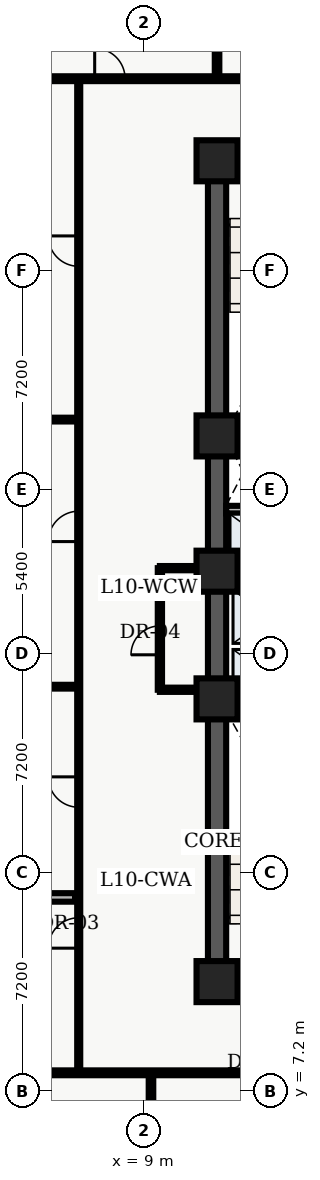
"""IFC4 building model, lengths in metres.
Left out: names, types, materials, properties, quantities, classifications, styles, units other than length and angle.
Written with IfcOpenShell. Run it as: python <this file> out.ifc"""

import sys

from ifc_helpers import new_model, entity, si_unit, converted_unit, direction, frame, origin_with_axes, origin_2d_with_axis, place, context, subcontext, project, spatial, polyline, rectangle, outline, extrude, element, fill, save


model = new_model("IFC4")
c1 = context("Model", 3, precision=1e-05, world=origin_with_axes(), true_north=direction((0.0, 1.0)))
c2 = subcontext(c1, "Body", "Model", "MODEL_VIEW")
j1 = project(units=[si_unit("LENGTHUNIT", "METRE"), converted_unit("PLANEANGLEUNIT", "DEGREE", entity("IfcPlaneAngleMeasure", 0.017), si_unit("PLANEANGLEUNIT", "RADIAN"), dimensions=[0, 0, 0, 0, 0, 0, 0])], contexts=[c1])
p1 = place(None, origin_with_axes())
s1 = spatial("IfcSite", under=j1, at=p1, CompositionType="ELEMENT")
p2 = place(p1, origin_with_axes())
s2 = spatial("IfcBuilding", under=s1, at=p2, CompositionType="ELEMENT")
p3 = place(p2, frame((0.0, 0.0, 44.4), z_axis=(0.0, 0.0, 1.0), x_axis=(1.0, 0.0, 0.0)))
s3 = spatial("IfcBuildingStorey", under=s2, at=p3, CompositionType="ELEMENT", Elevation=44.4)
p4 = place(p3, frame((11.4, 10.8, 0.0), z_axis=(0.0, 0.0, 1.0), x_axis=(0.0, 1.0, 0.0)))
e1 = element("IfcWall", 1, at=p4, inside=s3, PredefinedType="SHEAR", context=c2, shape_type="SweptSolid", body=[
    extrude(outline(polyline([(0.0, -0.3), (27.0, -0.3), (27.0, 0.3), (0.0, 0.3), (0.0, -0.3)])), origin_with_axes(), (0.0, 0.0, 1.0), 3.66),
])
p5 = place(p3, frame((11.4, 10.8, 0.0), z_axis=(0.0, 0.0, 1.0), x_axis=(1.0, 0.0, 0.0)))
e2 = element("IfcWall", 2, at=p5, inside=s3, PredefinedType="SHEAR", context=c2, shape_type="SweptSolid", body=[
    extrude(outline(polyline([(0.0, -0.3), (7.2, -0.3), (7.2, 0.3), (0.0, 0.3), (0.0, -0.3)])), origin_with_axes(), (0.0, 0.0, 1.0), 3.66),
])
p6 = place(p5, frame((2.625, 0.0, 0.0), z_axis=(0.0, 0.0, 1.0), x_axis=(1.0, 0.0, 0.0)))
e3 = element("IfcOpeningElement", 3, at=p6, cuts=e2, PredefinedType="OPENING", context=c2, shape_type="SweptSolid", body=[
    extrude(rectangle(XDim=1.05, YDim=0.62, at=origin_2d_with_axis()), origin_with_axes(), (0.0, 0.0, 1.0), 2.15),
])
p7 = place(p3, frame((11.4, 37.8, 0.0), z_axis=(0.0, 0.0, 1.0), x_axis=(1.0, 0.0, 0.0)))
e4 = element("IfcWall", 4, at=p7, inside=s3, PredefinedType="SHEAR", context=c2, shape_type="SweptSolid", body=[
    extrude(outline(polyline([(0.0, -0.3), (7.2, -0.3), (7.2, 0.3), (0.0, 0.3), (0.0, -0.3)])), origin_with_axes(), (0.0, 0.0, 1.0), 3.66),
])
p8 = place(p7, frame((2.625, 0.0, 0.0), z_axis=(0.0, 0.0, 1.0), x_axis=(1.0, 0.0, 0.0)))
e5 = element("IfcOpeningElement", 5, at=p8, cuts=e4, PredefinedType="OPENING", context=c2, shape_type="SweptSolid", body=[
    extrude(rectangle(XDim=1.05, YDim=0.62, at=origin_2d_with_axis()), origin_with_axes(), (0.0, 0.0, 1.0), 2.15),
])
for number, where, z_axis, x_axis in (
    (6, (11.7, 19.825, 0.0), (0.0, 0.0, 1.0), (1.0, 0.0, 0.0)),
    (7, (11.7, 28.775, 0.0), (0.0, 0.0, 1.0), (1.0, 0.0, 0.0)),
):
    element("IfcWall", number, at=place(p3, frame(where, z_axis=z_axis, x_axis=x_axis)), inside=s3, PredefinedType="SHEAR", context=c2, shape_type="SweptSolid", body=[
        extrude(outline(polyline([(0.0, -0.125), (6.6, -0.125), (6.6, 0.125), (0.0, 0.125), (0.0, -0.125)])), origin_with_axes(), (0.0, 0.0, 1.0), 3.66),
    ])
p9 = place(p3, frame((11.7, 24.1, 0.0), z_axis=(0.0, 0.0, 1.0), x_axis=(1.0, 0.0, 0.0)))
e8 = element("IfcWall", 8, at=p9, inside=s3, PredefinedType="SOLIDWALL", context=c2, shape_type="SweptSolid", body=[
    extrude(outline(polyline([(0.0, -0.125), (6.6, -0.125), (6.6, 0.125), (0.0, 0.125), (0.0, -0.125)])), origin_with_axes(), (0.0, 0.0, 1.0), 2.7),
])
p10 = place(p9, frame((3.6, 0.0, 0.0), z_axis=(0.0, 0.0, 1.0), x_axis=(1.0, 0.0, 0.0)))
e9 = element("IfcOpeningElement", 9, at=p10, cuts=e8, PredefinedType="OPENING", context=c2, shape_type="SweptSolid", body=[
    extrude(rectangle(XDim=0.9, YDim=0.27, at=origin_2d_with_axis()), origin_with_axes(), (0.0, 0.0, 1.0), 2.15),
])
p11 = place(p9, frame((5.65, 0.0, 0.0), z_axis=(0.0, 0.0, 1.0), x_axis=(1.0, 0.0, 0.0)))
e10 = element("IfcOpeningElement", 10, at=p11, cuts=e8, PredefinedType="OPENING", context=c2, shape_type="SweptSolid", body=[
    extrude(rectangle(XDim=0.9, YDim=0.27, at=origin_2d_with_axis()), origin_with_axes(), (0.0, 0.0, 1.0), 2.15),
])
p12 = place(p3, frame((11.7, 26.325, 0.0), z_axis=(0.0, 0.0, 1.0), x_axis=(1.0, 0.0, 0.0)))
e11 = element("IfcWall", 11, at=p12, inside=s3, PredefinedType="SOLIDWALL", context=c2, shape_type="SweptSolid", body=[
    extrude(outline(polyline([(0.0, -0.125), (6.6, -0.125), (6.6, 0.125), (0.0, 0.125), (0.0, -0.125)])), origin_with_axes(), (0.0, 0.0, 1.0), 2.7),
])
p13 = place(p12, frame((3.5, 0.0, 0.0), z_axis=(0.0, 0.0, 1.0), x_axis=(1.0, 0.0, 0.0)))
e12 = element("IfcOpeningElement", 12, at=p13, cuts=e11, PredefinedType="OPENING", context=c2, shape_type="SweptSolid", body=[
    extrude(rectangle(XDim=0.9, YDim=0.27, at=origin_2d_with_axis()), origin_with_axes(), (0.0, 0.0, 1.0), 2.15),
])
for number, where, z_axis, x_axis in (
    (13, (11.4, 10.8, 0.0), (0.0, 0.0, 1.0), (1.0, 0.0, 0.0)),
    (14, (11.4, 20.1, 0.0), (0.0, 0.0, 1.0), (1.0, 0.0, 0.0)),
    (15, (11.4, 24.3, 0.0), (0.0, 0.0, 1.0), (1.0, 0.0, 0.0)),
    (16, (11.4, 28.75, 0.0), (0.0, 0.0, 1.0), (1.0, 0.0, 0.0)),
    (17, (11.4, 37.8, 0.0), (0.0, 0.0, 1.0), (1.0, 0.0, 0.0)),
):
    element("IfcColumn", number, at=place(p3, frame(where, z_axis=z_axis, x_axis=x_axis)), inside=s3, PredefinedType="COLUMN", context=c2, shape_type="SweptSolid", body=[
        extrude(rectangle(XDim=1.35, YDim=1.35, at=origin_2d_with_axis()), origin_with_axes(), (0.0, 0.0, 1.0), 3.9),
    ])
p14 = place(p3, frame((9.52, 20.4, 0.0), z_axis=(0.0, 0.0, 1.0), x_axis=(0.0, 1.0, 0.0)))
e18 = element("IfcWall", 18, at=p14, inside=s3, PredefinedType="PARTITIONING", context=c2, shape_type="SweptSolid", body=[
    extrude(outline(polyline([(0.0, -0.07), (4.0, -0.07), (4.0, 0.07), (0.0, 0.07), (0.0, -0.07)])), origin_with_axes(), (0.0, 0.0, 1.0), 2.7),
])
p15 = place(p14, frame((1.625, 0.0, 0.0), z_axis=(0.0, 0.0, 1.0), x_axis=(1.0, 0.0, 0.0)))
e19 = element("IfcOpeningElement", 19, at=p15, cuts=e18, PredefinedType="OPENING", context=c2, shape_type="SweptSolid", body=[
    extrude(rectangle(XDim=0.95, YDim=0.16, at=origin_2d_with_axis()), origin_with_axes(), (0.0, 0.0, 1.0), 2.15),
])
for number, where, z_axis, x_axis in (
    (20, (9.52, 20.4, 0.0), (0.0, 0.0, 1.0), (1.0, 0.0, 0.0)),
    (21, (9.52, 24.4, 0.0), (0.0, 0.0, 1.0), (1.0, 0.0, 0.0)),
):
    element("IfcWall", number, at=place(p3, frame(where, z_axis=z_axis, x_axis=x_axis)), inside=s3, PredefinedType="PARTITIONING", context=c2, shape_type="SweptSolid", body=[
        extrude(outline(polyline([(0.0, -0.07), (1.58, -0.07), (1.58, 0.07), (0.0, 0.07), (0.0, -0.07)])), origin_with_axes(), (0.0, 0.0, 1.0), 2.7),
    ])
p16 = place(p3, frame((2.6, 7.8, 0.0), z_axis=(0.0, 0.0, 1.0), x_axis=(1.0, 0.0, 0.0)))
e22 = element("IfcWall", 22, at=p16, inside=s3, PredefinedType="PARTITIONING", context=c2, shape_type="SweptSolid", body=[
    extrude(outline(polyline([(0.0, -0.08), (18.55, -0.08), (18.55, 0.08), (0.0, 0.08), (0.0, -0.08)])), origin_with_axes(), (0.0, 0.0, 1.0), 2.7),
])
p17 = place(p16, frame((2.059, 0.0, 0.0), z_axis=(0.0, 0.0, 1.0), x_axis=(1.0, 0.0, 0.0)))
e23 = element("IfcOpeningElement", 23, at=p17, cuts=e22, PredefinedType="OPENING", context=c2, shape_type="SweptSolid", body=[
    extrude(rectangle(XDim=1.0, YDim=0.18, at=origin_2d_with_axis()), origin_with_axes(), (0.0, 0.0, 1.0), 2.15),
])
p18 = place(p16, frame((10.516, 0.0, 0.0), z_axis=(0.0, 0.0, 1.0), x_axis=(1.0, 0.0, 0.0)))
e24 = element("IfcOpeningElement", 24, at=p18, cuts=e22, PredefinedType="OPENING", context=c2, shape_type="SweptSolid", body=[
    extrude(rectangle(XDim=1.2, YDim=0.18, at=origin_2d_with_axis()), origin_with_axes(), (0.0, 0.0, 1.0), 2.2),
])
p19 = place(p16, frame((16.453, 0.0, 0.0), z_axis=(0.0, 0.0, 1.0), x_axis=(1.0, 0.0, 0.0)))
e25 = element("IfcOpeningElement", 25, at=p19, cuts=e22, PredefinedType="OPENING", context=c2, shape_type="SweptSolid", body=[
    extrude(rectangle(XDim=1.0, YDim=0.18, at=origin_2d_with_axis()), origin_with_axes(), (0.0, 0.0, 1.0), 2.15),
])
p20 = place(p3, frame((2.6, 40.5, 0.0), z_axis=(0.0, 0.0, 1.0), x_axis=(1.0, 0.0, 0.0)))
e26 = element("IfcWall", 26, at=p20, inside=s3, PredefinedType="PARTITIONING", context=c2, shape_type="SweptSolid", body=[
    extrude(outline(polyline([(0.0, -0.08), (18.65, -0.08), (18.65, 0.08), (0.0, 0.08), (0.0, -0.08)])), origin_with_axes(), (0.0, 0.0, 1.0), 2.7),
])
p21 = place(p20, frame((5.275, 0.0, 0.0), z_axis=(0.0, 0.0, 1.0), x_axis=(1.0, 0.0, 0.0)))
e27 = element("IfcOpeningElement", 27, at=p21, cuts=e26, PredefinedType="OPENING", context=c2, shape_type="SweptSolid", body=[
    extrude(rectangle(XDim=1.0, YDim=0.18, at=origin_2d_with_axis()), origin_with_axes(), (0.0, 0.0, 1.0), 2.15),
])
p22 = place(p20, frame((12.61, 0.0, 0.0), z_axis=(0.0, 0.0, 1.0), x_axis=(1.0, 0.0, 0.0)))
e28 = element("IfcOpeningElement", 28, at=p22, cuts=e26, PredefinedType="OPENING", context=c2, shape_type="SweptSolid", body=[
    extrude(rectangle(XDim=1.2, YDim=0.18, at=origin_2d_with_axis()), origin_with_axes(), (0.0, 0.0, 1.0), 2.2),
])
p23 = place(p3, frame((6.85, 7.8, 0.0), z_axis=(0.0, 0.0, 1.0), x_axis=(0.0, 1.0, 0.0)))
e29 = element("IfcWall", 29, at=p23, inside=s3, PredefinedType="PARTITIONING", context=c2, shape_type="SweptSolid", body=[
    extrude(outline(polyline([(0.0, -0.05), (32.7, -0.05), (32.7, 0.05), (0.0, 0.05), (0.0, -0.05)])), origin_with_axes(), (0.0, 0.0, 1.0), 2.7),
])
p24 = place(p23, frame((4.6, 0.0, 0.0), z_axis=(0.0, 0.0, 1.0), x_axis=(1.0, 0.0, 0.0)))
e30 = element("IfcOpeningElement", 30, at=p24, cuts=e29, PredefinedType="OPENING", context=c2, shape_type="SweptSolid", body=[
    extrude(rectangle(XDim=1.0, YDim=0.12, at=origin_2d_with_axis()), origin_with_axes(), (0.0, 0.0, 1.0), 2.15),
])
p25 = place(p23, frame((9.235, 0.0, 0.0), z_axis=(0.0, 0.0, 1.0), x_axis=(1.0, 0.0, 0.0)))
e31 = element("IfcOpeningElement", 31, at=p25, cuts=e29, PredefinedType="OPENING", context=c2, shape_type="SweptSolid", body=[
    extrude(rectangle(XDim=1.0, YDim=0.12, at=origin_2d_with_axis()), origin_with_axes(), (0.0, 0.0, 1.0), 2.15),
])
p26 = place(p23, frame((17.974, 0.0, 0.0), z_axis=(0.0, 0.0, 1.0), x_axis=(1.0, 0.0, 0.0)))
e32 = element("IfcOpeningElement", 32, at=p26, cuts=e29, PredefinedType="OPENING", context=c2, shape_type="SweptSolid", body=[
    extrude(rectangle(XDim=1.0, YDim=0.12, at=origin_2d_with_axis()), origin_with_axes(), (0.0, 0.0, 1.0), 2.15),
])
p27 = place(p23, frame((27.029, 0.0, 0.0), z_axis=(0.0, 0.0, 1.0), x_axis=(1.0, 0.0, 0.0)))
e33 = element("IfcOpeningElement", 33, at=p27, cuts=e29, PredefinedType="OPENING", context=c2, shape_type="SweptSolid", body=[
    extrude(rectangle(XDim=1.0, YDim=0.12, at=origin_2d_with_axis()), origin_with_axes(), (0.0, 0.0, 1.0), 2.15),
])
p28 = place(p3, frame((0.375, 13.569, 0.0), z_axis=(0.0, 0.0, 1.0), x_axis=(1.0, 0.0, 0.0)))
e34 = element("IfcWall", 34, at=p28, inside=s3, PredefinedType="PARTITIONING", context=c2, shape_type="SweptSolid", body=[
    extrude(outline(polyline([(0.0, -0.14), (6.355, -0.14), (6.355, 0.14), (0.0, 0.14), (0.0, -0.14)])), origin_with_axes(), (0.0, 0.0, 1.0), 2.7),
])
for number, where, z_axis, x_axis in (
    (35, (0.375, 20.501, 0.0), (0.0, 0.0, 1.0), (1.0, 0.0, 0.0)),
    (36, (0.375, 29.287, 0.0), (0.0, 0.0, 1.0), (1.0, 0.0, 0.0)),
):
    element("IfcWall", number, at=place(p3, frame(where, z_axis=z_axis, x_axis=x_axis)), inside=s3, PredefinedType="PARTITIONING", context=c2, shape_type="SweptSolid", body=[
        extrude(outline(polyline([(0.0, -0.062), (6.355, -0.062), (6.355, 0.062), (0.0, 0.062), (0.0, -0.062)])), origin_with_axes(), (0.0, 0.0, 1.0), 2.7),
    ])
p29 = place(p3, frame((9.227, 0.36, 0.0), z_axis=(0.0, 0.0, 1.0), x_axis=(0.0, 1.0, 0.0)))
e37 = element("IfcWall", 37, at=p29, inside=s3, PredefinedType="PARTITIONING", context=c2, shape_type="SweptSolid", body=[
    extrude(outline(polyline([(0.0, -0.075), (7.34, -0.075), (7.34, 0.075), (0.0, 0.075), (0.0, -0.075)])), origin_with_axes(), (0.0, 0.0, 1.0), 2.7),
])
p30 = place(p3, frame((11.4, 40.6, 0.0), z_axis=(0.0, 0.0, 1.0), x_axis=(0.0, 1.0, 0.0)))
e38 = element("IfcWall", 38, at=p30, inside=s3, PredefinedType="PARTITIONING", context=c2, shape_type="SweptSolid", body=[
    extrude(outline(polyline([(0.0, -0.075), (7.64, -0.075), (7.64, 0.075), (0.0, 0.075), (0.0, -0.075)])), origin_with_axes(), (0.0, 0.0, 1.0), 2.7),
])
p31 = place(p14, frame((1.625, 0.0, 0.0), z_axis=(0.0, 0.0, 1.0), x_axis=(1.0, 0.0, 0.0)))
e39 = element("IfcDoor", 39, at=p31, inside=s3, OperationType="SINGLE_SWING_LEFT", PredefinedType="DOOR", context=c2, shape_type="SweptSolid", body=[
    extrude(rectangle(XDim=0.95, YDim=0.084, at=origin_2d_with_axis()), origin_with_axes(), (0.0, 0.0, 1.0), 2.15),
])
fill(e19, e39)
p32 = place(p23, frame((4.6, 0.0, 0.0), z_axis=(0.0, 0.0, 1.0), x_axis=(1.0, 0.0, 0.0)))
e40 = element("IfcDoor", 40, at=p32, inside=s3, OperationType="SINGLE_SWING_LEFT", PredefinedType="DOOR", context=c2, shape_type="SweptSolid", body=[
    extrude(rectangle(XDim=1.0, YDim=0.06, at=origin_2d_with_axis()), origin_with_axes(), (0.0, 0.0, 1.0), 2.15),
])
fill(e30, e40)
p33 = place(p23, frame((9.235, 0.0, 0.0), z_axis=(0.0, 0.0, 1.0), x_axis=(1.0, 0.0, 0.0)))
e41 = element("IfcDoor", 41, at=p33, inside=s3, OperationType="SINGLE_SWING_RIGHT", PredefinedType="DOOR", context=c2, shape_type="SweptSolid", body=[
    extrude(rectangle(XDim=1.0, YDim=0.06, at=origin_2d_with_axis()), origin_with_axes(), (0.0, 0.0, 1.0), 2.15),
])
fill(e31, e41)
p34 = place(p23, frame((17.974, 0.0, 0.0), z_axis=(0.0, 0.0, 1.0), x_axis=(1.0, 0.0, 0.0)))
e42 = element("IfcDoor", 42, at=p34, inside=s3, OperationType="SINGLE_SWING_LEFT", PredefinedType="DOOR", context=c2, shape_type="SweptSolid", body=[
    extrude(rectangle(XDim=1.0, YDim=0.06, at=origin_2d_with_axis()), origin_with_axes(), (0.0, 0.0, 1.0), 2.15),
])
fill(e32, e42)
p35 = place(p23, frame((27.029, 0.0, 0.0), z_axis=(0.0, 0.0, 1.0), x_axis=(1.0, 0.0, 0.0)))
e43 = element("IfcDoor", 43, at=p35, inside=s3, OperationType="SINGLE_SWING_RIGHT", PredefinedType="DOOR", context=c2, shape_type="SweptSolid", body=[
    extrude(rectangle(XDim=1.0, YDim=0.06, at=origin_2d_with_axis()), origin_with_axes(), (0.0, 0.0, 1.0), 2.15),
])
fill(e33, e43)
p36 = place(p20, frame((5.275, 0.0, 0.0), z_axis=(0.0, 0.0, 1.0), x_axis=(1.0, 0.0, 0.0)))
e44 = element("IfcDoor", 44, at=p36, inside=s3, OperationType="SINGLE_SWING_LEFT", PredefinedType="DOOR", context=c2, shape_type="SweptSolid", body=[
    extrude(rectangle(XDim=1.0, YDim=0.09, at=origin_2d_with_axis()), origin_with_axes(), (0.0, 0.0, 1.0), 2.15),
])
fill(e27, e44)
save(model, sys.argv[1])
